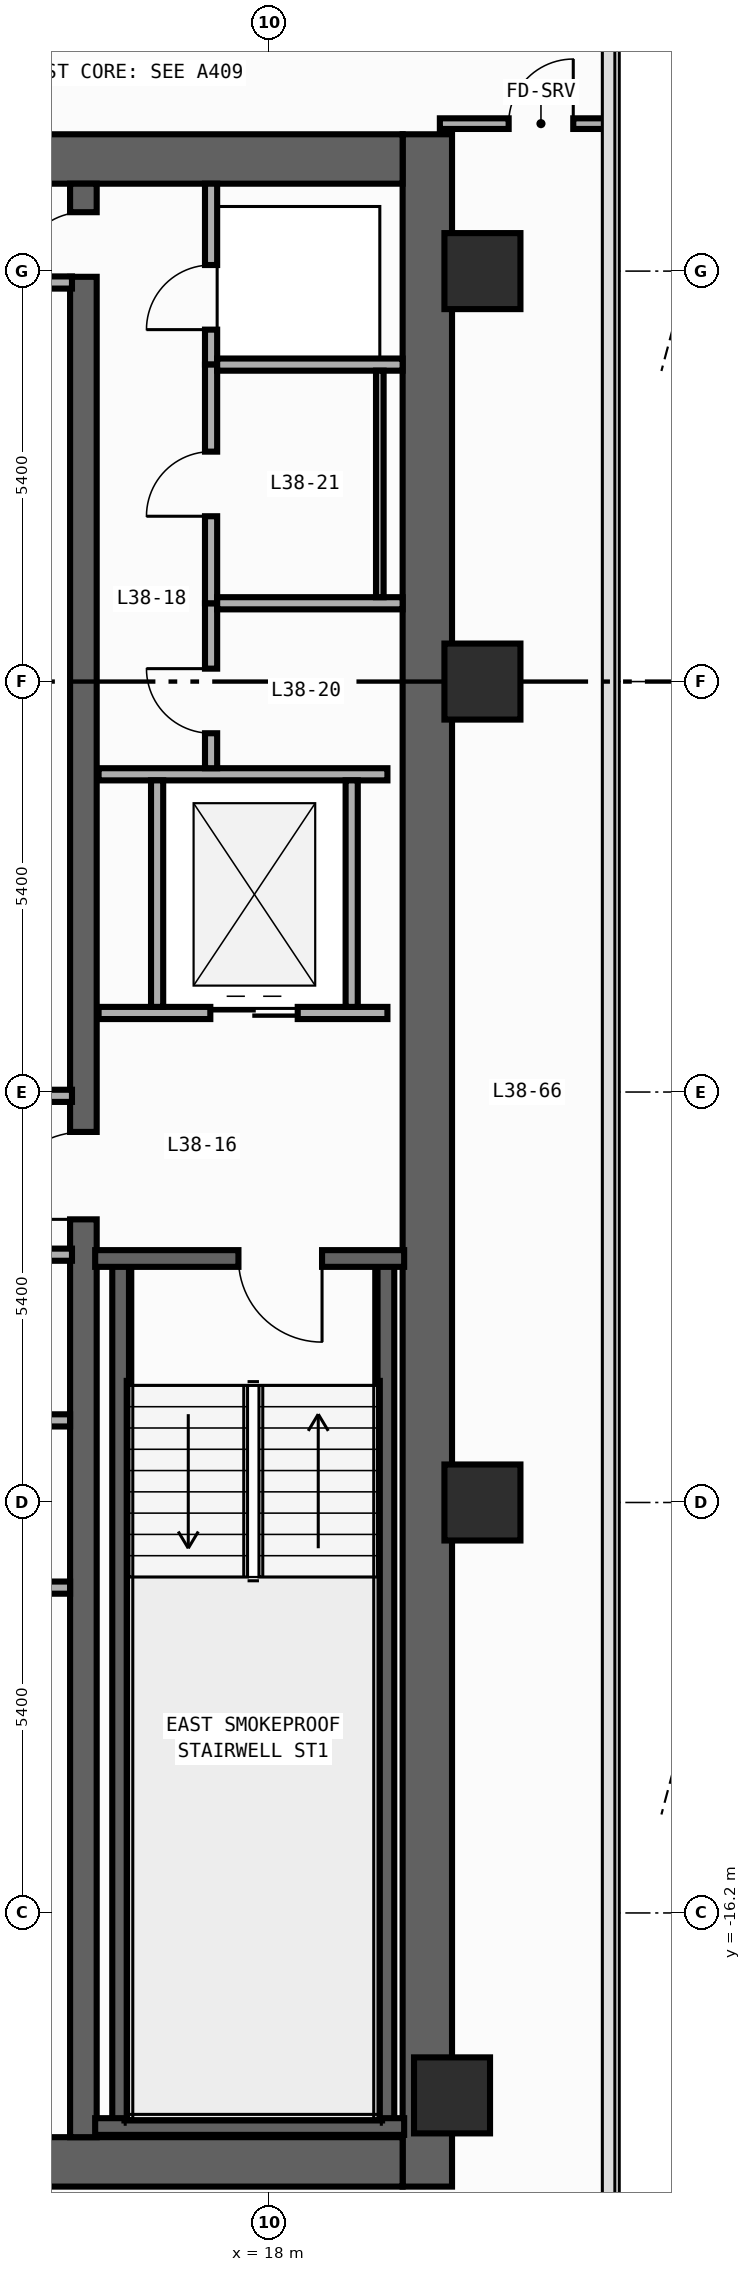
"""IFC4 building model, lengths in metres.
Left out: names, types, materials, properties, quantities, classifications, styles, units other than length and angle.
Written with IfcOpenShell. Run it as: python <this file> out.ifc"""

import sys

from ifc_helpers import new_model, si_unit, direction, frame, frame_2d, origin, origin_2d, place, context, subcontext, project, spatial, rectangle, extrude, element, fill, save


model = new_model("IFC4")
c1 = context("Model", 3, precision=1e-05, world=origin(), true_north=direction((0.0, 1.0)))
c2 = subcontext(c1, "Body", "Model", "MODEL_VIEW")
j1 = project(units=[si_unit("LENGTHUNIT", "METRE"), si_unit("PLANEANGLEUNIT", "RADIAN")], contexts=[c1])
p1 = place(None, origin())
s1 = spatial("IfcSite", under=j1, at=p1, CompositionType="ELEMENT")
p2 = place(p1, origin())
s2 = spatial("IfcBuilding", under=s1, at=p2, CompositionType="ELEMENT")
p3 = place(p2, frame((0.0, 0.0, 168.8)))
s3 = spatial("IfcBuildingStorey", under=s2, at=p3, CompositionType="ELEMENT", Elevation=168.8)
p4 = place(p3, frame((20.075, -19.8, 0.0), z_axis=(0.0, 0.0, 1.0), x_axis=(0.0, 1.0, 0.0)))
e1 = element("IfcWall", 1, at=p4, inside=s3, PredefinedType="SHEAR", context=c2, shape_type="SweptSolid", body=[
    extrude(rectangle(XDim=27.0, YDim=0.65, at=frame_2d((13.5, 0.0))), origin(), (0.0, 0.0, 1.0), 3.54),
])
for number, where, z_axis, x_axis in (
    (2, (12.65, -19.475, 0.0), (0.0, 0.0, 1.0), (1.0, 0.0, 0.0)),
    (3, (12.65, 6.875, 0.0), (0.0, 0.0, 1.0), (1.0, 0.0, 0.0)),
):
    element("IfcWall", number, at=place(p3, frame(where, z_axis=z_axis, x_axis=x_axis)), inside=s3, PredefinedType="SHEAR", context=c2, shape_type="SweptSolid", body=[
        extrude(rectangle(XDim=7.1, YDim=0.65, at=frame_2d((3.55, 0.0))), origin(), (0.0, 0.0, 1.0), 3.54),
    ])
p5 = place(p3, frame((15.55, -19.15, 0.0), z_axis=(0.0, 0.0, 1.0), x_axis=(0.0, 1.0, 0.0)))
e4 = element("IfcWall", 4, at=p5, inside=s3, PredefinedType="SHEAR", context=c2, shape_type="SweptSolid", body=[
    extrude(rectangle(XDim=25.7, YDim=0.35, at=frame_2d((12.85, 0.0))), origin(), (0.0, 0.0, 1.0), 3.54),
])
p6 = place(p5, frame((12.075, 0.0, 0.0)))
e5 = element("IfcOpeningElement", 5, at=p6, cuts=e4, PredefinedType="OPENING", context=c2, shape_type="SweptSolid", body=[
    extrude(rectangle(XDim=1.15, YDim=2.2, at=frame_2d((0.575, 1.1))), frame((0.0, 0.185, 0.0), z_axis=(0.0, -1.0, 0.0), x_axis=(1.0, 0.0, 0.0)), (0.0, 0.0, 1.0), 0.37),
])
p7 = place(p5, frame((24.475, 0.0, 0.0)))
e6 = element("IfcOpeningElement", 6, at=p7, cuts=e4, PredefinedType="OPENING", context=c2, shape_type="SweptSolid", body=[
    extrude(rectangle(XDim=0.85, YDim=2.1, at=frame_2d((0.425, 1.05))), frame((0.0, 0.185, 0.0), z_axis=(0.0, -1.0, 0.0), x_axis=(1.0, 0.0, 0.0)), (0.0, 0.0, 1.0), 0.37),
])
for number, where, z_axis, x_axis in (
    (7, (16.04, -19.01, 0.0), (0.0, 0.0, 1.0), (0.0, 1.0, 0.0)),
    (8, (19.53, -19.01, 0.0), (0.0, 0.0, 1.0), (0.0, 1.0, 0.0)),
):
    element("IfcWall", number, at=place(p3, frame(where, z_axis=z_axis, x_axis=x_axis)), inside=s3, PredefinedType="SHEAR", context=c2, shape_type="SweptSolid", body=[
        extrude(rectangle(XDim=11.42, YDim=0.22, at=frame_2d((5.71, 0.0))), origin(), (0.0, 0.0, 1.0), 3.54),
    ])
p8 = place(p3, frame((15.705, -19.01, 0.0), z_axis=(0.0, 0.0, 1.0), x_axis=(1.0, 0.0, 0.0)))
e9 = element("IfcWall", 9, at=p8, inside=s3, PredefinedType="SHEAR", context=c2, shape_type="SweptSolid", body=[
    extrude(rectangle(XDim=4.065, YDim=0.22, at=frame_2d((2.032, 0.0))), origin(), (0.0, 0.0, 1.0), 3.54),
])
p9 = place(p3, frame((19.77, -7.59, 0.0), z_axis=(0.0, 0.0, 1.0), x_axis=(-1.0, 0.0, 0.0)))
e10 = element("IfcWall", 10, at=p9, inside=s3, PredefinedType="SHEAR", context=c2, shape_type="SweptSolid", body=[
    extrude(rectangle(XDim=4.065, YDim=0.22, at=frame_2d((2.032, 0.0))), origin(), (0.0, 0.0, 1.0), 3.54),
])
p10 = place(p9, frame((1.08, 0.0, 0.0)))
e11 = element("IfcOpeningElement", 11, at=p10, cuts=e10, PredefinedType="OPENING", context=c2, shape_type="SweptSolid", body=[
    extrude(rectangle(XDim=1.1, YDim=2.2, at=frame_2d((0.55, 1.1))), frame((0.0, 0.12, 0.0), z_axis=(0.0, -1.0, 0.0), x_axis=(1.0, 0.0, 0.0)), (0.0, 0.0, 1.0), 0.24),
])
for number, where, z_axis, x_axis in (
    (12, (20.4, -18.6, 0.0), (0.0, 0.0, 1.0), (1.0, 0.0, 0.0)),
    (13, (20.8, -10.8, 0.0), (0.0, 0.0, 1.0), (1.0, 0.0, 0.0)),
    (14, (20.8, 0.0, 0.0), (0.0, 0.0, 1.0), (1.0, 0.0, 0.0)),
    (15, (20.8, 5.4, 0.0), (0.0, 0.0, 1.0), (1.0, 0.0, 0.0)),
):
    element("IfcColumn", number, at=place(p3, frame(where, z_axis=z_axis, x_axis=x_axis)), inside=s3, PredefinedType="COLUMN", context=c2, shape_type="SweptSolid", body=[
        extrude(rectangle(XDim=1.0, YDim=1.0, at=origin_2d()), origin(), (0.0, 0.0, 1.0), 3.8),
    ])
p11 = place(p3, frame((15.75, -4.36, 0.0), z_axis=(0.0, 0.0, 1.0), x_axis=(1.0, 0.0, 0.0)))
e16 = element("IfcWall", 16, at=p11, inside=s3, PredefinedType="STANDARD", context=c2, shape_type="SweptSolid", body=[
    extrude(rectangle(XDim=3.8, YDim=0.16, at=frame_2d((1.9, 0.0))), origin(), (0.0, 0.0, 1.0), 3.54),
])
p12 = place(p11, frame((1.47, 0.0, 0.0)))
e17 = element("IfcOpeningElement", 17, at=p12, cuts=e16, PredefinedType="OPENING", context=c2, shape_type="SweptSolid", body=[
    extrude(rectangle(XDim=1.15, YDim=2.2, at=frame_2d((0.575, 1.1))), frame((0.0, 0.09, 0.0), z_axis=(0.0, -1.0, 0.0), x_axis=(1.0, 0.0, 0.0)), (0.0, 0.0, 1.0), 0.18),
])
p13 = place(p3, frame((15.75, -1.22, 0.0), z_axis=(0.0, 0.0, 1.0), x_axis=(1.0, 0.0, 0.0)))
e18 = element("IfcWall", 18, at=p13, inside=s3, PredefinedType="STANDARD", context=c2, shape_type="SweptSolid", body=[
    extrude(rectangle(XDim=3.8, YDim=0.16, at=frame_2d((1.9, 0.0))), origin(), (0.0, 0.0, 1.0), 3.54),
])
for number, where, z_axis, x_axis in (
    (19, (16.52, -4.28, 0.0), (0.0, 0.0, 1.0), (0.0, 1.0, 0.0)),
    (20, (19.08, -4.28, 0.0), (0.0, 0.0, 1.0), (0.0, 1.0, 0.0)),
):
    element("IfcWall", number, at=place(p3, frame(where, z_axis=z_axis, x_axis=x_axis)), inside=s3, PredefinedType="STANDARD", context=c2, shape_type="SweptSolid", body=[
        extrude(rectangle(XDim=2.98, YDim=0.16, at=frame_2d((1.49, 0.0))), origin(), (0.0, 0.0, 1.0), 3.54),
    ])
for number, where, z_axis, x_axis in (
    (21, (12.8, -5.45, 0.0), (0.0, 0.0, 1.0), (1.0, 0.0, 0.0)),
    (22, (12.8, -7.54, 0.0), (0.0, 0.0, 1.0), (1.0, 0.0, 0.0)),
    (23, (12.8, 5.25, 0.0), (0.0, 0.0, 1.0), (1.0, 0.0, 0.0)),
):
    element("IfcWall", number, at=place(p3, frame(where, z_axis=z_axis, x_axis=x_axis)), inside=s3, PredefinedType="STANDARD", context=c2, shape_type="SweptSolid", body=[
        extrude(rectangle(XDim=2.6, YDim=0.16, at=frame_2d((1.3, 0.0))), origin(), (0.0, 0.0, 1.0), 3.54),
    ])
p14 = place(p3, frame((17.23, 4.17, 0.0), z_axis=(0.0, 0.0, 1.0), x_axis=(0.0, 1.0, 0.0)))
e24 = element("IfcWall", 24, at=p14, inside=s3, PredefinedType="PARTITIONING", context=c2, shape_type="SweptSolid", body=[
    extrude(rectangle(XDim=2.38, YDim=0.16, at=frame_2d((1.19, 0.0))), origin(), (0.0, 0.0, 1.0), 3.54),
])
p15 = place(p14, frame((0.46, 0.0, 0.0)))
e25 = element("IfcOpeningElement", 25, at=p15, cuts=e24, PredefinedType="OPENING", context=c2, shape_type="SweptSolid", body=[
    extrude(rectangle(XDim=0.85, YDim=2.1, at=frame_2d((0.425, 1.05))), frame((0.0, 0.09, 0.0), z_axis=(0.0, -1.0, 0.0), x_axis=(1.0, 0.0, 0.0)), (0.0, 0.0, 1.0), 0.18),
])
p16 = place(p3, frame((17.23, -1.14, 0.0), z_axis=(0.0, 0.0, 1.0), x_axis=(0.0, 1.0, 0.0)))
e26 = element("IfcWall", 26, at=p16, inside=s3, PredefinedType="PARTITIONING", context=c2, shape_type="SweptSolid", body=[
    extrude(rectangle(XDim=2.17, YDim=0.16, at=frame_2d((1.085, 0.0))), origin(), (0.0, 0.0, 1.0), 3.54),
])
p17 = place(p16, frame((0.46, 0.0, 0.0)))
e27 = element("IfcOpeningElement", 27, at=p17, cuts=e26, PredefinedType="OPENING", context=c2, shape_type="SweptSolid", body=[
    extrude(rectangle(XDim=0.85, YDim=2.1, at=frame_2d((0.425, 1.05))), frame((0.0, 0.09, 0.0), z_axis=(0.0, -1.0, 0.0), x_axis=(1.0, 0.0, 0.0)), (0.0, 0.0, 1.0), 0.18),
])
p18 = place(p3, frame((17.23, 1.03, 0.0), z_axis=(0.0, 0.0, 1.0), x_axis=(0.0, 1.0, 0.0)))
e28 = element("IfcWall", 28, at=p18, inside=s3, PredefinedType="PARTITIONING", context=c2, shape_type="SweptSolid", body=[
    extrude(rectangle(XDim=3.14, YDim=0.16, at=frame_2d((1.57, 0.0))), origin(), (0.0, 0.0, 1.0), 3.54),
])
p19 = place(p18, frame((1.145, 0.0, 0.0)))
e29 = element("IfcOpeningElement", 29, at=p19, cuts=e28, PredefinedType="OPENING", context=c2, shape_type="SweptSolid", body=[
    extrude(rectangle(XDim=0.85, YDim=2.1, at=frame_2d((0.425, 1.05))), frame((0.0, 0.09, 0.0), z_axis=(0.0, -1.0, 0.0), x_axis=(1.0, 0.0, 0.0)), (0.0, 0.0, 1.0), 0.18),
])
for number, where, z_axis, x_axis in (
    (30, (17.31, 4.17, 0.0), (0.0, 0.0, 1.0), (1.0, 0.0, 0.0)),
    (31, (17.31, 1.03, 0.0), (0.0, 0.0, 1.0), (1.0, 0.0, 0.0)),
):
    element("IfcWall", number, at=place(p3, frame(where, z_axis=z_axis, x_axis=x_axis)), inside=s3, PredefinedType="PARTITIONING", context=c2, shape_type="SweptSolid", body=[
        extrude(rectangle(XDim=2.44, YDim=0.16, at=frame_2d((1.22, 0.0))), origin(), (0.0, 0.0, 1.0), 3.54),
    ])
for number, where, z_axis, x_axis in (
    (32, (12.31, -11.92, 0.0), (0.0, 0.0, 1.0), (1.0, 0.0, 0.0)),
    (33, (12.31, -9.72, 0.0), (0.0, 0.0, 1.0), (1.0, 0.0, 0.0)),
):
    element("IfcWall", number, at=place(p3, frame(where, z_axis=z_axis, x_axis=x_axis)), inside=s3, PredefinedType="PARTITIONING", context=c2, shape_type="SweptSolid", body=[
        extrude(rectangle(XDim=3.065, YDim=0.16, at=frame_2d((1.532, 0.0))), origin(), (0.0, 0.0, 1.0), 3.54),
    ])
p20 = place(p3, frame((20.24, 7.34, 0.0), z_axis=(0.0, 0.0, 1.0), x_axis=(1.0, 0.0, 0.0)))
e34 = element("IfcWall", 34, at=p20, inside=s3, PredefinedType="PARTITIONING", context=c2, shape_type="SweptSolid", body=[
    extrude(rectangle(XDim=2.215, YDim=0.14, at=frame_2d((1.107, 0.0))), origin(), (0.0, 0.0, 1.0), 3.54),
])
p21 = place(p20, frame((0.905, 0.0, 0.0)))
e35 = element("IfcOpeningElement", 35, at=p21, cuts=e34, PredefinedType="OPENING", context=c2, shape_type="SweptSolid", body=[
    extrude(rectangle(XDim=0.85, YDim=2.1, at=frame_2d((0.425, 1.05))), frame((0.0, 0.08, 0.0), z_axis=(0.0, -1.0, 0.0), x_axis=(1.0, 0.0, 0.0)), (0.0, 0.0, 1.0), 0.16),
])
p22 = place(p3, frame((19.45, 4.09, 0.0), z_axis=(0.0, 0.0, 1.0), x_axis=(0.0, -1.0, 0.0)))
e36 = element("IfcWall", 36, at=p22, inside=s3, PredefinedType="PARTITIONING", context=c2, shape_type="SweptSolid", body=[
    extrude(rectangle(XDim=2.98, YDim=0.1, at=frame_2d((1.49, 0.0))), origin(), (0.0, 0.0, 1.0), 3.54),
])
p23 = place(p10, origin())
e37 = element("IfcDoor", 37, at=p23, inside=s3, OperationType="SINGLE_SWING_LEFT", PredefinedType="DOOR", context=c2, shape_type="SweptSolid", body=[
    extrude(rectangle(XDim=1.1, YDim=2.2, at=frame_2d((0.55, 1.1))), frame((0.0, 0.025, 0.0), z_axis=(0.0, -1.0, 0.0), x_axis=(1.0, 0.0, 0.0)), (0.0, 0.0, 1.0), 0.05),
])
fill(e11, e37)
p24 = place(p6, origin())
e38 = element("IfcDoor", 38, at=p24, inside=s3, OperationType="SINGLE_SWING_LEFT", PredefinedType="DOOR", context=c2, shape_type="SweptSolid", body=[
    extrude(rectangle(XDim=1.15, YDim=2.2, at=frame_2d((0.575, 1.1))), frame((0.0, 0.025, 0.0), z_axis=(0.0, -1.0, 0.0), x_axis=(1.0, 0.0, 0.0)), (0.0, 0.0, 1.0), 0.05),
])
fill(e5, e38)
p25 = place(p7, origin())
e39 = element("IfcDoor", 39, at=p25, inside=s3, OperationType="SINGLE_SWING_LEFT", PredefinedType="DOOR", context=c2, shape_type="SweptSolid", body=[
    extrude(rectangle(XDim=0.85, YDim=2.1, at=frame_2d((0.425, 1.05))), frame((0.0, 0.025, 0.0), z_axis=(0.0, -1.0, 0.0), x_axis=(1.0, 0.0, 0.0)), (0.0, 0.0, 1.0), 0.05),
])
fill(e6, e39)
p26 = place(p12, origin())
e40 = element("IfcDoor", 40, at=p26, inside=s3, OperationType="DOUBLE_DOOR_SLIDING", PredefinedType="DOOR", context=c2, shape_type="SweptSolid", body=[
    extrude(rectangle(XDim=1.15, YDim=2.2, at=frame_2d((0.575, 1.1))), frame((0.0, 0.025, 0.0), z_axis=(0.0, -1.0, 0.0), x_axis=(1.0, 0.0, 0.0)), (0.0, 0.0, 1.0), 0.05),
])
fill(e17, e40)
p27 = place(p15, origin())
e41 = element("IfcDoor", 41, at=p27, inside=s3, OperationType="SINGLE_SWING_LEFT", PredefinedType="DOOR", context=c2, shape_type="SweptSolid", body=[
    extrude(rectangle(XDim=0.85, YDim=2.1, at=frame_2d((0.425, 1.05))), frame((0.0, 0.025, 0.0), z_axis=(0.0, -1.0, 0.0), x_axis=(1.0, 0.0, 0.0)), (0.0, 0.0, 1.0), 0.05),
])
fill(e25, e41)
p28 = place(p17, origin())
e42 = element("IfcDoor", 42, at=p28, inside=s3, OperationType="SINGLE_SWING_RIGHT", PredefinedType="DOOR", context=c2, shape_type="SweptSolid", body=[
    extrude(rectangle(XDim=0.85, YDim=2.1, at=frame_2d((0.425, 1.05))), frame((0.0, 0.025, 0.0), z_axis=(0.0, -1.0, 0.0), x_axis=(1.0, 0.0, 0.0)), (0.0, 0.0, 1.0), 0.05),
])
fill(e27, e42)
p29 = place(p19, origin())
e43 = element("IfcDoor", 43, at=p29, inside=s3, OperationType="SINGLE_SWING_LEFT", PredefinedType="DOOR", context=c2, shape_type="SweptSolid", body=[
    extrude(rectangle(XDim=0.85, YDim=2.1, at=frame_2d((0.425, 1.05))), frame((0.0, 0.025, 0.0), z_axis=(0.0, -1.0, 0.0), x_axis=(1.0, 0.0, 0.0)), (0.0, 0.0, 1.0), 0.05),
])
fill(e29, e43)
p30 = place(p21, origin())
e44 = element("IfcDoor", 44, at=p30, inside=s3, OperationType="SINGLE_SWING_RIGHT", PredefinedType="DOOR", context=c2, shape_type="SweptSolid", body=[
    extrude(rectangle(XDim=0.85, YDim=2.1, at=frame_2d((0.425, 1.05))), frame((0.0, 0.025, 0.0), z_axis=(0.0, -1.0, 0.0), x_axis=(1.0, 0.0, 0.0)), (0.0, 0.0, 1.0), 0.05),
])
fill(e35, e44)
save(model, sys.argv[1])
